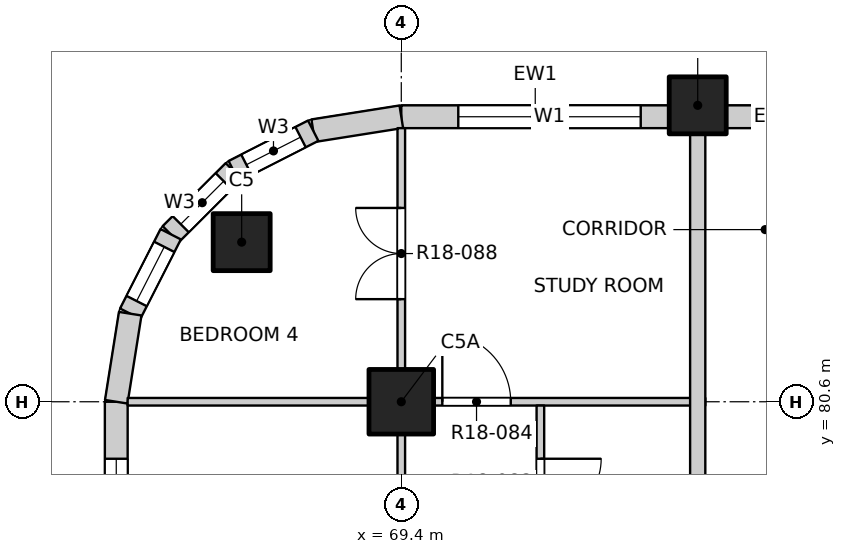
"""IFC4 building model, lengths in metres.
Left out: names, types, materials, properties, quantities, classifications, styles, units other than length and angle.
Written with IfcOpenShell. Run it as: python <this file> out.ifc"""

import sys

from ifc_helpers import new_model, si_unit, direction, frame, frame_2d, origin, origin_2d, place, context, subcontext, project, spatial, rectangle, extrude, element, fill, save


model = new_model("IFC4")
c1 = context("Model", 3, precision=1e-05, world=origin(), true_north=direction((0.0, 1.0)))
c2 = subcontext(c1, "Body", "Model", "MODEL_VIEW")
j1 = project(units=[si_unit("LENGTHUNIT", "METRE"), si_unit("PLANEANGLEUNIT", "RADIAN")], contexts=[c1])
p1 = place(None, origin())
s1 = spatial("IfcSite", under=j1, at=p1, CompositionType="ELEMENT")
p2 = place(p1, origin())
s2 = spatial("IfcBuilding", under=s1, at=p2, CompositionType="ELEMENT")
p3 = place(p2, frame((0.0, 0.0, 186.0)))
s3 = spatial("IfcBuildingStorey", under=s2, at=p3, CompositionType="ELEMENT", Elevation=186.0)
for number, where, z_axis, x_axis in (
    (1, (67.3, 82.7, -0.25), (0.0, 0.0, 1.0), (1.0, 0.0, 0.0)),
    (2, (73.3, 84.5, -0.25), (0.0, 0.0, 1.0), (1.0, 0.0, 0.0)),
):
    element("IfcColumn", number, at=place(p3, frame(where, z_axis=z_axis, x_axis=x_axis)), inside=s3, PredefinedType="COLUMN", context=c2, shape_type="SweptSolid", body=[
        extrude(rectangle(XDim=0.75, YDim=0.75, at=origin_2d()), origin(), (0.0, 0.0, 1.0), 3.4),
    ])
p4 = place(p3, frame((69.4, 80.6, -0.25), z_axis=(0.0, 0.0, 1.0), x_axis=(1.0, 0.0, 0.0)))
e3 = element("IfcColumn", 3, at=p4, inside=s3, PredefinedType="COLUMN", context=c2, shape_type="SweptSolid", body=[
    extrude(rectangle(XDim=0.85, YDim=0.85, at=origin_2d()), origin(), (0.0, 0.0, 1.0), 3.4),
])
p5 = place(p3, frame((69.4, 84.35, 0.0), z_axis=(0.0, 0.0, 1.0), x_axis=(1.0, 0.0, 0.0)))
e4 = element("IfcWall", 4, at=p5, inside=s3, PredefinedType="SOLIDWALL", context=c2, shape_type="SweptSolid", body=[
    extrude(rectangle(XDim=3.525, YDim=0.3, at=frame_2d((1.763, 0.0))), origin(), (0.0, 0.0, 1.0), 2.7),
])
p6 = place(p5, frame((0.75, 0.0, 0.9)))
e5 = element("IfcOpeningElement", 5, at=p6, cuts=e4, PredefinedType="OPENING", context=c2, shape_type="SweptSolid", body=[
    extrude(rectangle(XDim=2.4, YDim=1.8, at=frame_2d((1.2, 0.9))), frame((0.0, 0.16, 0.0), z_axis=(0.0, -1.0, 0.0), x_axis=(1.0, 0.0, 0.0)), (0.0, 0.0, 1.0), 0.32),
])
p7 = place(p3, frame((73.675, 84.35, 0.0), z_axis=(0.0, 0.0, 1.0), x_axis=(1.0, 0.0, 0.0)))
e6 = element("IfcWall", 6, at=p7, inside=s3, PredefinedType="SOLIDWALL", context=c2, shape_type="SweptSolid", body=[
    extrude(rectangle(XDim=1.3, YDim=0.3, at=frame_2d((0.65, 0.0))), origin(), (0.0, 0.0, 1.0), 2.7),
])
p8 = place(p3, frame((65.65, 77.075, 0.0), z_axis=(0.0, 0.0, 1.0), x_axis=(0.0, 1.0, 0.0)))
e7 = element("IfcWall", 7, at=p8, inside=s3, PredefinedType="SOLIDWALL", context=c2, shape_type="SweptSolid", body=[
    extrude(rectangle(XDim=3.525, YDim=0.3, at=frame_2d((1.763, 0.0))), origin(), (0.0, 0.0, 1.0), 2.7),
])
p9 = place(p8, frame((0.375, 0.0, 0.9)))
e8 = element("IfcOpeningElement", 8, at=p9, cuts=e7, PredefinedType="OPENING", context=c2, shape_type="SweptSolid", body=[
    extrude(rectangle(XDim=2.4, YDim=1.8, at=frame_2d((1.2, 0.9))), frame((0.0, 0.16, 0.0), z_axis=(0.0, -1.0, 0.0), x_axis=(1.0, 0.0, 0.0)), (0.0, 0.0, 1.0), 0.32),
])
p10 = place(p3, frame((69.4, 84.35, 0.0), z_axis=(0.0, 0.0, 1.0), x_axis=(-0.987678452879, -0.156496880861, 0.0)))
e9 = element("IfcWall", 9, at=p10, inside=s3, PredefinedType="SOLIDWALL", context=c2, shape_type="SweptSolid", body=[
    extrude(rectangle(XDim=1.173, YDim=0.3, at=frame_2d((0.586, 0.0))), origin(), (0.0, 0.0, 1.0), 2.7),
])
p11 = place(p3, frame((68.241, 84.167, 0.0), z_axis=(0.0, 0.0, 1.0), x_axis=(-0.890988677504, -0.454025524128, 0.0)))
e10 = element("IfcWall", 10, at=p11, inside=s3, PredefinedType="SOLIDWALL", context=c2, shape_type="SweptSolid", body=[
    extrude(rectangle(XDim=1.173, YDim=0.3, at=frame_2d((0.587, 0.0))), origin(), (0.0, 0.0, 1.0), 2.7),
])
p12 = place(p11, frame((0.187, 0.0, 0.9)))
e11 = element("IfcOpeningElement", 11, at=p12, cuts=e10, PredefinedType="OPENING", context=c2, shape_type="SweptSolid", body=[
    extrude(rectangle(XDim=0.8, YDim=1.2, at=frame_2d((0.4, 0.6))), frame((0.0, 0.16, 0.0), z_axis=(0.0, -1.0, 0.0), x_axis=(1.0, 0.0, 0.0)), (0.0, 0.0, 1.0), 0.32),
])
p13 = place(p3, frame((67.196, 83.634, 0.0), z_axis=(0.0, 0.0, 1.0), x_axis=(-0.707106781187, -0.707106781187, 0.0)))
e12 = element("IfcWall", 12, at=p13, inside=s3, PredefinedType="SOLIDWALL", context=c2, shape_type="SweptSolid", body=[
    extrude(rectangle(XDim=1.173, YDim=0.3, at=frame_2d((0.586, 0.0))), origin(), (0.0, 0.0, 1.0), 2.7),
])
p14 = place(p13, frame((0.187, 0.0, 0.9)))
e13 = element("IfcOpeningElement", 13, at=p14, cuts=e12, PredefinedType="OPENING", context=c2, shape_type="SweptSolid", body=[
    extrude(rectangle(XDim=0.8, YDim=1.2, at=frame_2d((0.4, 0.6))), frame((0.0, 0.16, 0.0), z_axis=(0.0, -1.0, 0.0), x_axis=(1.0, 0.0, 0.0)), (0.0, 0.0, 1.0), 0.32),
])
p15 = place(p3, frame((66.366, 82.804, 0.0), z_axis=(0.0, 0.0, 1.0), x_axis=(-0.454025524128, -0.890988677504, 0.0)))
e14 = element("IfcWall", 14, at=p15, inside=s3, PredefinedType="SOLIDWALL", context=c2, shape_type="SweptSolid", body=[
    extrude(rectangle(XDim=1.173, YDim=0.3, at=frame_2d((0.587, 0.0))), origin(), (0.0, 0.0, 1.0), 2.7),
])
p16 = place(p15, frame((0.187, 0.0, 0.9)))
e15 = element("IfcOpeningElement", 15, at=p16, cuts=e14, PredefinedType="OPENING", context=c2, shape_type="SweptSolid", body=[
    extrude(rectangle(XDim=0.8, YDim=1.2, at=frame_2d((0.4, 0.6))), frame((0.0, 0.16, 0.0), z_axis=(0.0, -1.0, 0.0), x_axis=(1.0, 0.0, 0.0)), (0.0, 0.0, 1.0), 0.32),
])
p17 = place(p3, frame((65.833, 81.759, 0.0), z_axis=(0.0, 0.0, 1.0), x_axis=(-0.156496880861, -0.987678452879, 0.0)))
e16 = element("IfcWall", 16, at=p17, inside=s3, PredefinedType="SOLIDWALL", context=c2, shape_type="SweptSolid", body=[
    extrude(rectangle(XDim=1.173, YDim=0.3, at=frame_2d((0.586, 0.0))), origin(), (0.0, 0.0, 1.0), 2.7),
])
p18 = place(p3, frame((65.8, 80.6, 0.0), z_axis=(0.0, 0.0, 1.0), x_axis=(1.0, 0.0, 0.0)))
e17 = element("IfcWall", 17, at=p18, inside=s3, PredefinedType="PARTITIONING", context=c2, shape_type="SweptSolid", body=[
    extrude(rectangle(XDim=7.6, YDim=0.1, at=frame_2d((3.8, 0.0))), origin(), (0.0, 0.0, 1.0), 3.15),
])
p19 = place(p18, frame((4.14, 0.0, 0.0)))
e18 = element("IfcOpeningElement", 18, at=p19, cuts=e17, PredefinedType="OPENING", context=c2, shape_type="SweptSolid", body=[
    extrude(rectangle(XDim=0.9, YDim=2.1, at=frame_2d((0.45, 1.05))), frame((0.0, 0.06, 0.0), z_axis=(0.0, -1.0, 0.0), x_axis=(1.0, 0.0, 0.0)), (0.0, 0.0, 1.0), 0.12),
])
p20 = place(p3, frame((69.4, 45.8, 0.0), z_axis=(0.0, 0.0, 1.0), x_axis=(0.0, 1.0, 0.0)))
e19 = element("IfcWall", 19, at=p20, inside=s3, PredefinedType="PARTITIONING", context=c2, shape_type="SweptSolid", body=[
    extrude(rectangle(XDim=38.4, YDim=0.1, at=frame_2d((19.2, 0.0))), origin(), (0.0, 0.0, 1.0), 3.15),
])
p21 = place(p20, frame((1.05, 0.0, 0.0)))
e20 = element("IfcOpeningElement", 20, at=p21, cuts=e19, PredefinedType="OPENING", context=c2, shape_type="SweptSolid", body=[
    extrude(rectangle(XDim=1.2, YDim=2.1, at=frame_2d((0.6, 1.05))), frame((0.0, 0.06, 0.0), z_axis=(0.0, -1.0, 0.0), x_axis=(1.0, 0.0, 0.0)), (0.0, 0.0, 1.0), 0.12),
])
p22 = place(p20, frame((5.1, 0.0, 0.0)))
e21 = element("IfcOpeningElement", 21, at=p22, cuts=e19, PredefinedType="OPENING", context=c2, shape_type="SweptSolid", body=[
    extrude(rectangle(XDim=0.9, YDim=2.1, at=frame_2d((0.45, 1.05))), frame((0.0, 0.06, 0.0), z_axis=(0.0, -1.0, 0.0), x_axis=(1.0, 0.0, 0.0)), (0.0, 0.0, 1.0), 0.12),
])
p23 = place(p20, frame((9.0, 0.0, 0.0)))
e22 = element("IfcOpeningElement", 22, at=p23, cuts=e19, PredefinedType="OPENING", context=c2, shape_type="SweptSolid", body=[
    extrude(rectangle(XDim=0.9, YDim=2.1, at=frame_2d((0.45, 1.05))), frame((0.0, 0.06, 0.0), z_axis=(0.0, -1.0, 0.0), x_axis=(1.0, 0.0, 0.0)), (0.0, 0.0, 1.0), 0.12),
])
p24 = place(p20, frame((12.9, 0.0, 0.0)))
e23 = element("IfcOpeningElement", 23, at=p24, cuts=e19, PredefinedType="OPENING", context=c2, shape_type="SweptSolid", body=[
    extrude(rectangle(XDim=0.9, YDim=2.1, at=frame_2d((0.45, 1.05))), frame((0.0, 0.06, 0.0), z_axis=(0.0, -1.0, 0.0), x_axis=(1.0, 0.0, 0.0)), (0.0, 0.0, 1.0), 0.12),
])
p25 = place(p20, frame((16.8, 0.0, 0.0)))
e24 = element("IfcOpeningElement", 24, at=p25, cuts=e19, PredefinedType="OPENING", context=c2, shape_type="SweptSolid", body=[
    extrude(rectangle(XDim=0.9, YDim=2.1, at=frame_2d((0.45, 1.05))), frame((0.0, 0.06, 0.0), z_axis=(0.0, -1.0, 0.0), x_axis=(1.0, 0.0, 0.0)), (0.0, 0.0, 1.0), 0.12),
])
p26 = place(p20, frame((20.7, 0.0, 0.0)))
e25 = element("IfcOpeningElement", 25, at=p26, cuts=e19, PredefinedType="OPENING", context=c2, shape_type="SweptSolid", body=[
    extrude(rectangle(XDim=0.9, YDim=2.1, at=frame_2d((0.45, 1.05))), frame((0.0, 0.06, 0.0), z_axis=(0.0, -1.0, 0.0), x_axis=(1.0, 0.0, 0.0)), (0.0, 0.0, 1.0), 0.12),
])
p27 = place(p20, frame((24.6, 0.0, 0.0)))
e26 = element("IfcOpeningElement", 26, at=p27, cuts=e19, PredefinedType="OPENING", context=c2, shape_type="SweptSolid", body=[
    extrude(rectangle(XDim=0.9, YDim=2.1, at=frame_2d((0.45, 1.05))), frame((0.0, 0.06, 0.0), z_axis=(0.0, -1.0, 0.0), x_axis=(1.0, 0.0, 0.0)), (0.0, 0.0, 1.0), 0.12),
])
p28 = place(p20, frame((28.5, 0.0, 0.0)))
e27 = element("IfcOpeningElement", 27, at=p28, cuts=e19, PredefinedType="OPENING", context=c2, shape_type="SweptSolid", body=[
    extrude(rectangle(XDim=0.9, YDim=2.1, at=frame_2d((0.45, 1.05))), frame((0.0, 0.06, 0.0), z_axis=(0.0, -1.0, 0.0), x_axis=(1.0, 0.0, 0.0)), (0.0, 0.0, 1.0), 0.12),
])
p29 = place(p20, frame((32.4, 0.0, 0.0)))
e28 = element("IfcOpeningElement", 28, at=p29, cuts=e19, PredefinedType="OPENING", context=c2, shape_type="SweptSolid", body=[
    extrude(rectangle(XDim=0.9, YDim=2.1, at=frame_2d((0.45, 1.05))), frame((0.0, 0.06, 0.0), z_axis=(0.0, -1.0, 0.0), x_axis=(1.0, 0.0, 0.0)), (0.0, 0.0, 1.0), 0.12),
])
p30 = place(p20, frame((36.15, 0.0, 0.0)))
e29 = element("IfcOpeningElement", 29, at=p30, cuts=e19, PredefinedType="OPENING", context=c2, shape_type="SweptSolid", body=[
    extrude(rectangle(XDim=1.2, YDim=2.1, at=frame_2d((0.6, 1.05))), frame((0.0, 0.06, 0.0), z_axis=(0.0, -1.0, 0.0), x_axis=(1.0, 0.0, 0.0)), (0.0, 0.0, 1.0), 0.12),
])
p31 = place(p3, frame((71.23, 71.35, 0.0), z_axis=(0.0, 0.0, 1.0), x_axis=(0.0, 1.0, 0.0)))
e30 = element("IfcWall", 30, at=p31, inside=s3, PredefinedType="PARTITIONING", context=c2, shape_type="SweptSolid", body=[
    extrude(rectangle(XDim=9.2, YDim=0.1, at=frame_2d((4.6, 0.0))), origin(), (0.0, 0.0, 1.0), 3.15),
])
p32 = place(p31, frame((0.4, 0.0, 0.0)))
e31 = element("IfcOpeningElement", 31, at=p32, cuts=e30, PredefinedType="OPENING", context=c2, shape_type="SweptSolid", body=[
    extrude(rectangle(XDim=0.9, YDim=2.1, at=frame_2d((0.45, 1.05))), frame((0.0, 0.06, 0.0), z_axis=(0.0, -1.0, 0.0), x_axis=(1.0, 0.0, 0.0)), (0.0, 0.0, 1.0), 0.12),
])
p33 = place(p31, frame((2.425, 0.0, 0.0)))
e32 = element("IfcOpeningElement", 32, at=p33, cuts=e30, PredefinedType="OPENING", context=c2, shape_type="SweptSolid", body=[
    extrude(rectangle(XDim=0.9, YDim=2.1, at=frame_2d((0.45, 1.05))), frame((0.0, 0.06, 0.0), z_axis=(0.0, -1.0, 0.0), x_axis=(1.0, 0.0, 0.0)), (0.0, 0.0, 1.0), 0.12),
])
p34 = place(p31, frame((5.025, 0.0, 0.0)))
e33 = element("IfcOpeningElement", 33, at=p34, cuts=e30, PredefinedType="OPENING", context=c2, shape_type="SweptSolid", body=[
    extrude(rectangle(XDim=0.9, YDim=2.1, at=frame_2d((0.45, 1.05))), frame((0.0, 0.06, 0.0), z_axis=(0.0, -1.0, 0.0), x_axis=(1.0, 0.0, 0.0)), (0.0, 0.0, 1.0), 0.12),
])
p35 = place(p31, frame((7.7, 0.0, 0.0)))
e34 = element("IfcOpeningElement", 34, at=p35, cuts=e30, PredefinedType="OPENING", context=c2, shape_type="SweptSolid", body=[
    extrude(rectangle(XDim=0.8, YDim=2.1, at=frame_2d((0.4, 1.05))), frame((0.0, 0.06, 0.0), z_axis=(0.0, -1.0, 0.0), x_axis=(1.0, 0.0, 0.0)), (0.0, 0.0, 1.0), 0.12),
])
p36 = place(p3, frame((73.3, 49.5, 0.0), z_axis=(0.0, 0.0, 1.0), x_axis=(0.0, 1.0, 0.0)))
e35 = element("IfcWall", 35, at=p36, inside=s3, PredefinedType="PARTITIONING", context=c2, shape_type="SweptSolid", body=[
    extrude(rectangle(XDim=34.7, YDim=0.2, at=frame_2d((17.35, 0.0))), origin(), (0.0, 0.0, 1.0), 3.15),
])
p37 = place(p36, frame((13.825, 0.0, 0.0)))
e36 = element("IfcOpeningElement", 36, at=p37, cuts=e35, PredefinedType="OPENING", context=c2, shape_type="SweptSolid", body=[
    extrude(rectangle(XDim=1.0, YDim=2.1, at=frame_2d((0.5, 1.05))), frame((0.0, 0.11, 0.0), z_axis=(0.0, -1.0, 0.0), x_axis=(1.0, 0.0, 0.0)), (0.0, 0.0, 1.0), 0.22),
])
p38 = place(p36, frame((21.975, 0.0, 0.0)))
e37 = element("IfcOpeningElement", 37, at=p38, cuts=e35, PredefinedType="OPENING", context=c2, shape_type="SweptSolid", body=[
    extrude(rectangle(XDim=1.0, YDim=2.1, at=frame_2d((0.5, 1.05))), frame((0.0, 0.11, 0.0), z_axis=(0.0, -1.0, 0.0), x_axis=(1.0, 0.0, 0.0)), (0.0, 0.0, 1.0), 0.22),
])
p39 = place(p6, origin())
e38 = element("IfcWindow", 38, at=p39, inside=s3, PartitioningType="DOUBLE_PANEL_VERTICAL", PredefinedType="WINDOW", context=c2, shape_type="SweptSolid", body=[
    extrude(rectangle(XDim=2.4, YDim=1.8, at=frame_2d((1.2, 0.9))), frame((0.0, 0.03, 0.0), z_axis=(0.0, -1.0, 0.0), x_axis=(1.0, 0.0, 0.0)), (0.0, 0.0, 1.0), 0.06),
])
fill(e5, e38)
p40 = place(p9, origin())
e39 = element("IfcWindow", 39, at=p40, inside=s3, PartitioningType="DOUBLE_PANEL_VERTICAL", PredefinedType="WINDOW", context=c2, shape_type="SweptSolid", body=[
    extrude(rectangle(XDim=2.4, YDim=1.8, at=frame_2d((1.2, 0.9))), frame((0.0, 0.03, 0.0), z_axis=(0.0, -1.0, 0.0), x_axis=(1.0, 0.0, 0.0)), (0.0, 0.0, 1.0), 0.06),
])
fill(e8, e39)
p41 = place(p12, origin())
e40 = element("IfcWindow", 40, at=p41, inside=s3, PartitioningType="SINGLE_PANEL", PredefinedType="WINDOW", context=c2, shape_type="SweptSolid", body=[
    extrude(rectangle(XDim=0.8, YDim=1.2, at=frame_2d((0.4, 0.6))), frame((0.0, 0.03, 0.0), z_axis=(0.0, -1.0, 0.0), x_axis=(1.0, 0.0, 0.0)), (0.0, 0.0, 1.0), 0.06),
])
fill(e11, e40)
p42 = place(p14, origin())
e41 = element("IfcWindow", 41, at=p42, inside=s3, PartitioningType="SINGLE_PANEL", PredefinedType="WINDOW", context=c2, shape_type="SweptSolid", body=[
    extrude(rectangle(XDim=0.8, YDim=1.2, at=frame_2d((0.4, 0.6))), frame((0.0, 0.03, 0.0), z_axis=(0.0, -1.0, 0.0), x_axis=(1.0, 0.0, 0.0)), (0.0, 0.0, 1.0), 0.06),
])
fill(e13, e41)
p43 = place(p16, origin())
e42 = element("IfcWindow", 42, at=p43, inside=s3, PartitioningType="SINGLE_PANEL", PredefinedType="WINDOW", context=c2, shape_type="SweptSolid", body=[
    extrude(rectangle(XDim=0.8, YDim=1.2, at=frame_2d((0.4, 0.6))), frame((0.0, 0.03, 0.0), z_axis=(0.0, -1.0, 0.0), x_axis=(1.0, 0.0, 0.0)), (0.0, 0.0, 1.0), 0.06),
])
fill(e15, e42)
p44 = place(p35, origin())
e43 = element("IfcDoor", 43, at=p44, inside=s3, OperationType="SINGLE_SWING_LEFT", PredefinedType="DOOR", context=c2, shape_type="SweptSolid", body=[
    extrude(rectangle(XDim=0.8, YDim=2.1, at=frame_2d((0.4, 1.05))), frame((0.0, 0.025, 0.0), z_axis=(0.0, -1.0, 0.0), x_axis=(1.0, 0.0, 0.0)), (0.0, 0.0, 1.0), 0.05),
])
fill(e34, e43)
p45 = place(p19, origin())
e44 = element("IfcDoor", 44, at=p45, inside=s3, OperationType="SINGLE_SWING_LEFT", PredefinedType="DOOR", context=c2, shape_type="SweptSolid", body=[
    extrude(rectangle(XDim=0.9, YDim=2.1, at=frame_2d((0.45, 1.05))), frame((0.0, 0.025, 0.0), z_axis=(0.0, -1.0, 0.0), x_axis=(1.0, 0.0, 0.0)), (0.0, 0.0, 1.0), 0.05),
])
fill(e18, e44)
p46 = place(p30, origin())
e45 = element("IfcDoor", 45, at=p46, inside=s3, OperationType="DOUBLE_DOOR_SINGLE_SWING", PredefinedType="DOOR", context=c2, shape_type="SweptSolid", body=[
    extrude(rectangle(XDim=1.2, YDim=2.1, at=frame_2d((0.6, 1.05))), frame((0.0, 0.025, 0.0), z_axis=(0.0, -1.0, 0.0), x_axis=(1.0, 0.0, 0.0)), (0.0, 0.0, 1.0), 0.05),
])
fill(e29, e45)
save(model, sys.argv[1])
